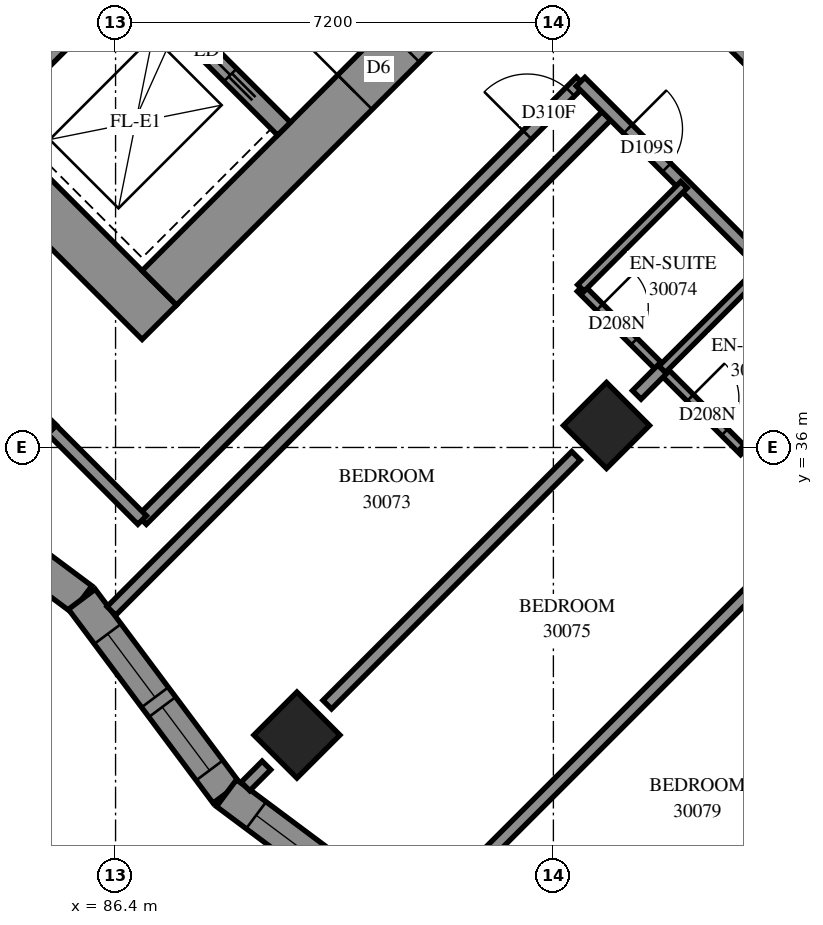
"""IFC4 building model, lengths in metres.
Left out: names, types, materials, properties, quantities, classifications, styles, units other than length and angle.
Written with IfcOpenShell. Run it as: python <this file> out.ifc"""

import sys

from ifc_helpers import new_model, si_unit, direction, frame, frame_2d, origin, origin_2d, place, context, subcontext, project, spatial, polyline, rectangle, outline, extrude, element, fill, save


model = new_model("IFC4")
c1 = context("Model", 3, precision=1e-05, world=origin(), true_north=direction((0.0, 1.0)))
c2 = subcontext(c1, "Body", "Model", "MODEL_VIEW")
j1 = project(units=[si_unit("LENGTHUNIT", "METRE"), si_unit("PLANEANGLEUNIT", "RADIAN")], contexts=[c1])
p1 = place(None, origin())
s1 = spatial("IfcSite", under=j1, at=p1, CompositionType="ELEMENT")
p2 = place(p1, origin())
s2 = spatial("IfcBuilding", under=s1, at=p2, CompositionType="ELEMENT")
p3 = place(p2, frame((0.0, 0.0, 111.8)))
s3 = spatial("IfcBuildingStorey", under=s2, at=p3, CompositionType="ELEMENT", Elevation=111.8)
for number, where, z_axis, x_axis in (
    (1, (94.474, 36.362, 0.0), (0.0, 0.0, 1.0), (0.707, -0.707, 0.0)),
    (2, (89.382, 31.271, 0.0), (0.0, 0.0, 1.0), (0.707, -0.707, 0.0)),
):
    element("IfcColumn", number, at=place(p3, frame(where, z_axis=z_axis, x_axis=x_axis)), inside=s3, PredefinedType="COLUMN", context=c2, shape_type="SweptSolid", body=[
        extrude(rectangle(XDim=1.0, YDim=1.0, at=origin_2d()), origin(), (0.0, 0.0, 1.0), 3.1),
    ])
p4 = place(p3, frame((75.806, 49.373, -0.3), z_axis=(0.0, 0.0, 1.0), x_axis=(0.7071067812, -0.7071067812, 0.0)))
e3 = element("IfcWall", 3, at=p4, inside=s3, PredefinedType="SHEAR", context=c2, shape_type="SweptSolid", body=[
    extrude(rectangle(XDim=16.0, YDim=0.8, at=frame_2d((8.0, 0.0))), origin(), (0.0, 0.0, 1.0), 2.7),
])
p5 = place(p3, frame((87.12, 38.625, -0.3), z_axis=(0.0, 0.0, 1.0), x_axis=(0.7071067812, 0.7071067812, 0.0)))
e4 = element("IfcWall", 4, at=p5, inside=s3, PredefinedType="SHEAR", context=c2, shape_type="SweptSolid", body=[
    extrude(rectangle(XDim=14.4, YDim=0.8, at=frame_2d((7.2, 0.0))), origin(), (0.0, 0.0, 1.0), 2.7),
])
p6 = place(p5, frame((4.55, 0.0, 0.3)))
e5 = element("IfcOpeningElement", 5, at=p6, cuts=e4, PredefinedType="OPENING", context=c2, shape_type="SweptSolid", body=[
    extrude(rectangle(XDim=1.1, YDim=2.1, at=frame_2d((0.55, 1.05))), frame((0.0, 0.41, 0.0), z_axis=(0.0, -1.0, 0.0), x_axis=(1.0, 0.0, 0.0)), (0.0, 0.0, 1.0), 0.82),
])
p7 = place(p5, frame((11.35, 0.0, 0.3)))
e6 = element("IfcOpeningElement", 6, at=p7, cuts=e4, PredefinedType="OPENING", context=c2, shape_type="SweptSolid", body=[
    extrude(rectangle(XDim=1.1, YDim=2.1, at=frame_2d((0.55, 1.05))), frame((0.0, 0.41, 0.0), z_axis=(0.0, -1.0, 0.0), x_axis=(1.0, 0.0, 0.0)), (0.0, 0.0, 1.0), 0.82),
])
p8 = place(p3, frame((84.291, 41.453, 0.0), z_axis=(0.0, 0.0, 1.0), x_axis=(0.7071067812, 0.7071067812, 0.0)))
e7 = element("IfcWall", 7, at=p8, inside=s3, PredefinedType="SOLIDWALL", context=c2, shape_type="SweptSolid", body=[
    extrude(rectangle(XDim=3.3, YDim=0.3, at=frame_2d((1.65, 0.0))), origin(), (0.0, 0.0, 1.0), 3.1),
])
p9 = place(p3, frame((78.988, 51.423, 0.0), z_axis=(0.0, 0.0, 1.0), x_axis=(0.7071067812, -0.7071067812, 0.0)))
e8 = element("IfcWall", 8, at=p9, inside=s3, PredefinedType="SOLIDWALL", context=c2, shape_type="SweptSolid", body=[
    extrude(rectangle(XDim=14.4, YDim=0.3, at=frame_2d((7.2, 0.0))), origin(), (0.0, 0.0, 1.0), 3.1),
])
p10 = place(p9, frame((1.25, 0.0, 0.0)))
e9 = element("IfcOpeningElement", 9, at=p10, cuts=e8, PredefinedType="OPENING", context=c2, shape_type="SweptSolid", body=[
    extrude(rectangle(XDim=1.1, YDim=2.1, at=frame_2d((0.55, 1.05))), frame((0.0, 0.16, 0.0), z_axis=(0.0, -1.0, 0.0), x_axis=(1.0, 0.0, 0.0)), (0.0, 0.0, 1.0), 0.32),
])
p11 = place(p9, frame((4.85, 0.0, 0.0)))
e10 = element("IfcOpeningElement", 10, at=p11, cuts=e8, PredefinedType="OPENING", context=c2, shape_type="SweptSolid", body=[
    extrude(rectangle(XDim=1.1, YDim=2.1, at=frame_2d((0.55, 1.05))), frame((0.0, 0.16, 0.0), z_axis=(0.0, -1.0, 0.0), x_axis=(1.0, 0.0, 0.0)), (0.0, 0.0, 1.0), 0.32),
])
p12 = place(p9, frame((8.45, 0.0, 0.0)))
e11 = element("IfcOpeningElement", 11, at=p12, cuts=e8, PredefinedType="OPENING", context=c2, shape_type="SweptSolid", body=[
    extrude(rectangle(XDim=1.1, YDim=2.1, at=frame_2d((0.55, 1.05))), frame((0.0, 0.16, 0.0), z_axis=(0.0, -1.0, 0.0), x_axis=(1.0, 0.0, 0.0)), (0.0, 0.0, 1.0), 0.32),
])
p13 = place(p9, frame((12.05, 0.0, 0.0)))
e12 = element("IfcOpeningElement", 12, at=p13, cuts=e8, PredefinedType="OPENING", context=c2, shape_type="SweptSolid", body=[
    extrude(rectangle(XDim=1.1, YDim=2.1, at=frame_2d((0.55, 1.05))), frame((0.0, 0.16, 0.0), z_axis=(0.0, -1.0, 0.0), x_axis=(1.0, 0.0, 0.0)), (0.0, 0.0, 1.0), 0.32),
])
p14 = place(p3, frame((82.658, 35.882, 0.0), z_axis=(0.0, 0.0, 1.0), x_axis=(0.8014458841, -0.5980672997, 0.0)))
e13 = element("IfcWall", 13, at=p14, inside=s3, PredefinedType="SOLIDWALL", context=c2, shape_type="SweptSolid", body=[
    extrude(outline(polyline([(-0.04, -0.275), (3.937, -0.275), (4.017, 0.275), (0.04, 0.275), (-0.04, -0.275)])), origin(), (0.0, 0.0, 1.0), 3.1),
])
p15 = place(p14, frame((1.701, 0.0, 0.5)))
e14 = element("IfcOpeningElement", 14, at=p15, cuts=e13, PredefinedType="OPENING", context=c2, shape_type="SweptSolid", body=[
    extrude(rectangle(XDim=1.2, YDim=2.45, at=frame_2d((0.6, 1.225))), frame((0.0, 0.285, 0.0), z_axis=(0.0, -1.0, 0.0), x_axis=(1.0, 0.0, 0.0)), (0.0, 0.0, 1.0), 0.57),
])
p16 = place(p3, frame((85.845, 33.504, 0.0), z_axis=(0.0, 0.0, 1.0), x_axis=(0.5980713977, -0.801442826, 0.0)))
e15 = element("IfcWall", 15, at=p16, inside=s3, PredefinedType="SOLIDWALL", context=c2, shape_type="SweptSolid", body=[
    extrude(outline(polyline([(0.04, -0.275), (4.017, -0.275), (3.937, 0.275), (-0.04, 0.275), (0.04, -0.275)])), origin(), (0.0, 0.0, 1.0), 3.1),
])
p17 = place(p16, frame((0.711, 0.0, 0.5)))
e16 = element("IfcOpeningElement", 16, at=p17, cuts=e15, PredefinedType="OPENING", context=c2, shape_type="SweptSolid", body=[
    extrude(rectangle(XDim=1.3, YDim=2.45, at=frame_2d((0.65, 1.225))), frame((0.0, 0.285, 0.0), z_axis=(0.0, -1.0, 0.0), x_axis=(1.0, 0.0, 0.0)), (0.0, 0.0, 1.0), 0.57),
])
p18 = place(p16, frame((2.211, 0.0, 0.5)))
e17 = element("IfcOpeningElement", 17, at=p18, cuts=e15, PredefinedType="OPENING", context=c2, shape_type="SweptSolid", body=[
    extrude(rectangle(XDim=1.3, YDim=2.45, at=frame_2d((0.65, 1.225))), frame((0.0, 0.285, 0.0), z_axis=(0.0, -1.0, 0.0), x_axis=(1.0, 0.0, 0.0)), (0.0, 0.0, 1.0), 0.57),
])
p19 = place(p3, frame((88.224, 30.316, 0.0), z_axis=(0.0, 0.0, 1.0), x_axis=(0.8014458841, -0.5980672997, 0.0)))
e18 = element("IfcWall", 18, at=p19, inside=s3, PredefinedType="SOLIDWALL", context=c2, shape_type="SweptSolid", body=[
    extrude(outline(polyline([(-0.04, -0.275), (3.937, -0.275), (4.017, 0.275), (0.04, 0.275), (-0.04, -0.275)])), origin(), (0.0, 0.0, 1.0), 3.1),
])
p20 = place(p19, frame((0.609, 0.0, 0.5)))
e19 = element("IfcOpeningElement", 19, at=p20, cuts=e18, PredefinedType="OPENING", context=c2, shape_type="SweptSolid", body=[
    extrude(rectangle(XDim=1.3, YDim=2.45, at=frame_2d((0.65, 1.225))), frame((0.0, 0.285, 0.0), z_axis=(0.0, -1.0, 0.0), x_axis=(1.0, 0.0, 0.0)), (0.0, 0.0, 1.0), 0.57),
])
p21 = place(p19, frame((2.109, 0.0, 0.5)))
e20 = element("IfcOpeningElement", 20, at=p21, cuts=e18, PredefinedType="OPENING", context=c2, shape_type="SweptSolid", body=[
    extrude(rectangle(XDim=1.3, YDim=2.45, at=frame_2d((0.65, 1.225))), frame((0.0, 0.285, 0.0), z_axis=(0.0, -1.0, 0.0), x_axis=(1.0, 0.0, 0.0)), (0.0, 0.0, 1.0), 0.57),
])
p22 = place(p3, frame((96.474, 23.09, 0.0), z_axis=(0.0, 0.0, 1.0), x_axis=(0.7071067812, 0.7071067812, 0.0)))
e21 = element("IfcWall", 21, at=p22, inside=s3, PredefinedType="PARTITIONING", context=c2, shape_type="SweptSolid", body=[
    extrude(rectangle(XDim=11.67, YDim=0.2, at=frame_2d((5.835, 0.0))), origin(), (0.0, 0.0, 1.0), 3.1),
])
p23 = place(p3, frame((86.331, 33.312, 0.0), z_axis=(0.0, 0.0, 1.0), x_axis=(0.707102476, 0.7071110864, 0.0)))
e22 = element("IfcWall", 22, at=p23, inside=s3, PredefinedType="PARTITIONING", context=c2, shape_type="SweptSolid", body=[
    extrude(rectangle(XDim=11.614, YDim=0.2, at=frame_2d((5.807, 0.0))), origin(), (0.0, 0.0, 1.0), 3.1),
])
p24 = place(p3, frame((91.452, 28.25, 0.0), z_axis=(0.0, 0.0, 1.0), x_axis=(0.7071931897, 0.7070203621, 0.0)))
e23 = element("IfcWall", 23, at=p24, inside=s3, PredefinedType="PARTITIONING", context=c2, shape_type="SweptSolid", body=[
    extrude(rectangle(XDim=11.572, YDim=0.2, at=frame_2d((5.786, 0.0))), origin(), (0.0, 0.0, 1.0), 3.1),
])
p25 = place(p3, frame((86.835, 34.806, 0.0), z_axis=(0.0, 0.0, 1.0), x_axis=(0.7071067812, 0.7071067812, 0.0)))
e24 = element("IfcWall", 24, at=p25, inside=s3, PredefinedType="PARTITIONING", context=c2, shape_type="SweptSolid", body=[
    extrude(rectangle(XDim=10.201, YDim=0.2, at=frame_2d((5.1, 0.0))), origin(), (0.0, 0.0, 1.0), 3.1),
])
p26 = place(p25, frame((8.959, 0.0, 0.0)))
e25 = element("IfcOpeningElement", 25, at=p26, cuts=e24, PredefinedType="OPENING", context=c2, shape_type="SweptSolid", body=[
    extrude(rectangle(XDim=1.0, YDim=2.1, at=frame_2d((0.5, 1.05))), frame((0.0, 0.11, 0.0), z_axis=(0.0, -1.0, 0.0), x_axis=(1.0, 0.0, 0.0)), (0.0, 0.0, 1.0), 0.22),
])
p27 = place(p3, frame((94.047, 42.015, 0.0), z_axis=(0.0, 0.0, 1.0), x_axis=(0.7071067812, -0.7071067812, 0.0)))
e26 = element("IfcWall", 26, at=p27, inside=s3, PredefinedType="PARTITIONING", context=c2, shape_type="SweptSolid", body=[
    extrude(rectangle(XDim=9.6, YDim=0.2, at=frame_2d((4.8, 0.0))), origin(), (0.0, 0.0, 1.0), 3.1),
])
p28 = place(p27, frame((1.099, 0.0, 0.0)))
e27 = element("IfcOpeningElement", 27, at=p28, cuts=e26, PredefinedType="OPENING", context=c2, shape_type="SweptSolid", body=[
    extrude(rectangle(XDim=0.9, YDim=2.1, at=frame_2d((0.45, 1.05))), frame((0.0, 0.11, 0.0), z_axis=(0.0, -1.0, 0.0), x_axis=(1.0, 0.0, 0.0)), (0.0, 0.0, 1.0), 0.22),
])
p29 = place(p27, frame((6.649, 0.0, 0.0)))
e28 = element("IfcOpeningElement", 28, at=p29, cuts=e26, PredefinedType="OPENING", context=c2, shape_type="SweptSolid", body=[
    extrude(rectangle(XDim=0.9, YDim=2.1, at=frame_2d((0.45, 1.05))), frame((0.0, 0.11, 0.0), z_axis=(0.0, -1.0, 0.0), x_axis=(1.0, 0.0, 0.0)), (0.0, 0.0, 1.0), 0.22),
])
p30 = place(p27, frame((8.3, 0.0, 0.0)))
e29 = element("IfcOpeningElement", 29, at=p30, cuts=e26, PredefinedType="OPENING", context=c2, shape_type="SweptSolid", body=[
    extrude(rectangle(XDim=0.9, YDim=2.1, at=frame_2d((0.45, 1.05))), frame((0.0, 0.11, 0.0), z_axis=(0.0, -1.0, 0.0), x_axis=(1.0, 0.0, 0.0)), (0.0, 0.0, 1.0), 0.22),
])
p31 = place(p3, frame((96.103, 43.083, 0.0), z_axis=(0.0, 0.0, 1.0), x_axis=(0.7071067812, -0.7071067812, 0.0)))
e30 = element("IfcWall", 30, at=p31, inside=s3, PredefinedType="PARTITIONING", context=c2, shape_type="SweptSolid", body=[
    extrude(rectangle(XDim=8.491, YDim=0.2, at=frame_2d((4.245, 0.0))), origin(), (0.0, 0.0, 1.0), 3.1),
])
p32 = place(p31, frame((1.995, 0.0, 0.0)))
e31 = element("IfcOpeningElement", 31, at=p32, cuts=e30, PredefinedType="OPENING", context=c2, shape_type="SweptSolid", body=[
    extrude(rectangle(XDim=0.9, YDim=2.1, at=frame_2d((0.45, 1.05))), frame((0.0, 0.11, 0.0), z_axis=(0.0, -1.0, 0.0), x_axis=(1.0, 0.0, 0.0)), (0.0, 0.0, 1.0), 0.22),
])
p33 = place(p31, frame((4.27, 0.0, 0.0)))
e32 = element("IfcOpeningElement", 32, at=p33, cuts=e30, PredefinedType="OPENING", context=c2, shape_type="SweptSolid", body=[
    extrude(rectangle(XDim=0.9, YDim=2.1, at=frame_2d((0.45, 1.05))), frame((0.0, 0.11, 0.0), z_axis=(0.0, -1.0, 0.0), x_axis=(1.0, 0.0, 0.0)), (0.0, 0.0, 1.0), 0.22),
])
p34 = place(p3, frame((89.881, 31.771, 0.0), z_axis=(0.0, 0.0, 1.0), x_axis=(0.7071067812, 0.7071067812, 0.0)))
e33 = element("IfcWall", 33, at=p34, inside=s3, PredefinedType="PARTITIONING", context=c2, shape_type="SweptSolid", body=[
    extrude(rectangle(XDim=5.787, YDim=0.2, at=frame_2d((2.893, 0.0))), origin(), (0.0, 0.0, 1.0), 3.1),
])
p35 = place(p3, frame((94.973, 26.681, 0.0), z_axis=(0.0, 0.0, 1.0), x_axis=(0.7071067812, 0.7071067812, 0.0)))
e34 = element("IfcWall", 34, at=p35, inside=s3, PredefinedType="PARTITIONING", context=c2, shape_type="SweptSolid", body=[
    extrude(rectangle(XDim=5.784, YDim=0.2, at=frame_2d((2.892, 0.0))), origin(), (0.0, 0.0, 1.0), 3.1),
])
p36 = place(p3, frame((94.047, 38.621, 0.0), z_axis=(0.0, 0.0, 1.0), x_axis=(0.7071067812, -0.7071067812, 0.0)))
e35 = element("IfcWall", 35, at=p36, inside=s3, PredefinedType="PARTITIONING", context=c2, shape_type="SweptSolid", body=[
    extrude(rectangle(XDim=3.799, YDim=0.15, at=frame_2d((1.899, 0.0))), origin(), (0.0, 0.0, 1.0), 3.1),
])
p37 = place(p36, frame((0.444, 0.0, 0.0)))
e36 = element("IfcOpeningElement", 36, at=p37, cuts=e35, PredefinedType="OPENING", context=c2, shape_type="SweptSolid", body=[
    extrude(rectangle(XDim=0.8, YDim=2.1, at=frame_2d((0.4, 1.05))), frame((0.0, 0.085, 0.0), z_axis=(0.0, -1.0, 0.0), x_axis=(1.0, 0.0, 0.0)), (0.0, 0.0, 1.0), 0.17),
])
p38 = place(p36, frame((2.551, 0.0, 0.0)))
e37 = element("IfcOpeningElement", 37, at=p38, cuts=e35, PredefinedType="OPENING", context=c2, shape_type="SweptSolid", body=[
    extrude(rectangle(XDim=0.8, YDim=2.1, at=frame_2d((0.4, 1.05))), frame((0.0, 0.085, 0.0), z_axis=(0.0, -1.0, 0.0), x_axis=(1.0, 0.0, 0.0)), (0.0, 0.0, 1.0), 0.17),
])
for number, where, z_axis, x_axis in (
    (38, (95.389, 37.285, 0.0), (0.0, 0.0, 1.0), (0.708, 0.707, 0.0)),
    (39, (94.052, 38.622, 0.0), (0.0, 0.0, 1.0), (0.707, 0.708, 0.0)),
    (40, (96.739, 35.935, 0.0), (0.0, 0.0, 1.0), (0.708, 0.707, 0.0)),
):
    element("IfcWall", number, at=place(p3, frame(where, z_axis=z_axis, x_axis=x_axis)), inside=s3, PredefinedType="PARTITIONING", context=c2, shape_type="SweptSolid", body=[
        extrude(rectangle(XDim=2.4, YDim=0.15, at=frame_2d((1.2, 0.0))), origin(), (0.0, 0.0, 1.0), 3.1),
    ])
p39 = place(p3, frame((85.353, 36.293, 0.0), z_axis=(0.0, 0.0, 1.0), x_axis=(0.7066304548, -0.7075827869, 0.0)))
e41 = element("IfcWall", 41, at=p39, inside=s3, PredefinedType="PARTITIONING", context=c2, shape_type="SweptSolid", body=[
    extrude(rectangle(XDim=2.1, YDim=0.2, at=frame_2d((1.05, 0.0))), origin(), (0.0, 0.0, 1.0), 3.1),
])
p40 = place(p3, frame((84.795, 36.855, 0.0), z_axis=(0.0, 0.0, 1.0), x_axis=(0.7071067812, -0.7071067812, 0.0)))
e42 = element("IfcWall", 42, at=p40, inside=s3, PredefinedType="PARTITIONING", context=c2, shape_type="SweptSolid", body=[
    extrude(rectangle(XDim=0.792, YDim=0.2, at=frame_2d((0.396, 0.0))), origin(), (0.0, 0.0, 1.0), 3.1),
])
p41 = place(p3, frame((94.971, 36.865, 0.0), z_axis=(0.0, 0.0, 1.0), x_axis=(0.7054171665, 0.7087923682, 0.0)))
e43 = element("IfcWall", 43, at=p41, inside=s3, PredefinedType="PARTITIONING", context=c2, shape_type="SweptSolid", body=[
    extrude(rectangle(XDim=0.593, YDim=0.2, at=frame_2d((0.296, 0.0))), origin(), (0.0, 0.0, 1.0), 3.1),
])
p42 = place(p3, frame((88.536, 30.426, 0.0), z_axis=(0.0, 0.0, 1.0), x_axis=(0.7071067812, 0.7071067812, 0.0)))
e44 = element("IfcWall", 44, at=p42, inside=s3, PredefinedType="PARTITIONING", context=c2, shape_type="SweptSolid", body=[
    extrude(rectangle(XDim=0.488, YDim=0.2, at=frame_2d((0.244, 0.0))), origin(), (0.0, 0.0, 1.0), 3.1),
])
p43 = place(p17, origin())
e45 = element("IfcWindow", 45, at=p43, inside=s3, PartitioningType="SINGLE_PANEL", PredefinedType="WINDOW", context=c2, shape_type="SweptSolid", body=[
    extrude(rectangle(XDim=1.3, YDim=2.45, at=frame_2d((0.65, 1.225))), frame((0.0, 0.155, 0.0), z_axis=(0.0, -1.0, 0.0), x_axis=(1.0, 0.0, 0.0)), (0.0, 0.0, 1.0), 0.06),
])
fill(e16, e45)
p44 = place(p18, origin())
e46 = element("IfcWindow", 46, at=p44, inside=s3, PartitioningType="SINGLE_PANEL", PredefinedType="WINDOW", context=c2, shape_type="SweptSolid", body=[
    extrude(rectangle(XDim=1.3, YDim=2.45, at=frame_2d((0.65, 1.225))), frame((0.0, 0.155, 0.0), z_axis=(0.0, -1.0, 0.0), x_axis=(1.0, 0.0, 0.0)), (0.0, 0.0, 1.0), 0.06),
])
fill(e17, e46)
p45 = place(p20, origin())
e47 = element("IfcWindow", 47, at=p45, inside=s3, PartitioningType="SINGLE_PANEL", PredefinedType="WINDOW", context=c2, shape_type="SweptSolid", body=[
    extrude(rectangle(XDim=1.3, YDim=2.45, at=frame_2d((0.65, 1.225))), frame((0.0, 0.155, 0.0), z_axis=(0.0, -1.0, 0.0), x_axis=(1.0, 0.0, 0.0)), (0.0, 0.0, 1.0), 0.06),
])
fill(e19, e47)
p46 = place(p6, origin())
e48 = element("IfcDoor", 48, at=p46, inside=s3, OperationType="DOUBLE_DOOR_SINGLE_SWING", PredefinedType="DOOR", context=c2, shape_type="SweptSolid", body=[
    extrude(rectangle(XDim=1.1, YDim=2.1, at=frame_2d((0.55, 1.05))), frame((0.0, 0.025, 0.0), z_axis=(0.0, -1.0, 0.0), x_axis=(1.0, 0.0, 0.0)), (0.0, 0.0, 1.0), 0.05),
])
fill(e5, e48)
p47 = place(p13, origin())
e49 = element("IfcDoor", 49, at=p47, inside=s3, OperationType="SLIDING_TO_RIGHT", PredefinedType="DOOR", context=c2, shape_type="SweptSolid", body=[
    extrude(rectangle(XDim=1.1, YDim=2.1, at=frame_2d((0.55, 1.05))), frame((0.0, 0.025, 0.0), z_axis=(0.0, -1.0, 0.0), x_axis=(1.0, 0.0, 0.0)), (0.0, 0.0, 1.0), 0.05),
])
fill(e12, e49)
p48 = place(p26, origin())
e50 = element("IfcDoor", 50, at=p48, inside=s3, OperationType="SINGLE_SWING_LEFT", PredefinedType="DOOR", context=c2, shape_type="SweptSolid", body=[
    extrude(rectangle(XDim=1.0, YDim=2.1, at=frame_2d((0.5, 1.05))), frame((0.0, 0.025, 0.0), z_axis=(0.0, -1.0, 0.0), x_axis=(1.0, 0.0, 0.0)), (0.0, 0.0, 1.0), 0.05),
])
fill(e25, e50)
p49 = place(p28, origin())
e51 = element("IfcDoor", 51, at=p49, inside=s3, OperationType="SINGLE_SWING_LEFT", PredefinedType="DOOR", context=c2, shape_type="SweptSolid", body=[
    extrude(rectangle(XDim=0.9, YDim=2.1, at=frame_2d((0.45, 1.05))), frame((0.0, 0.025, 0.0), z_axis=(0.0, -1.0, 0.0), x_axis=(1.0, 0.0, 0.0)), (0.0, 0.0, 1.0), 0.05),
])
fill(e27, e51)
p50 = place(p37, origin())
e52 = element("IfcDoor", 52, at=p50, inside=s3, OperationType="SINGLE_SWING_RIGHT", PredefinedType="DOOR", context=c2, shape_type="SweptSolid", body=[
    extrude(rectangle(XDim=0.8, YDim=2.1, at=frame_2d((0.4, 1.05))), frame((0.0, 0.025, 0.0), z_axis=(0.0, -1.0, 0.0), x_axis=(1.0, 0.0, 0.0)), (0.0, 0.0, 1.0), 0.05),
])
fill(e36, e52)
p51 = place(p38, origin())
e53 = element("IfcDoor", 53, at=p51, inside=s3, OperationType="SINGLE_SWING_RIGHT", PredefinedType="DOOR", context=c2, shape_type="SweptSolid", body=[
    extrude(rectangle(XDim=0.8, YDim=2.1, at=frame_2d((0.4, 1.05))), frame((0.0, 0.025, 0.0), z_axis=(0.0, -1.0, 0.0), x_axis=(1.0, 0.0, 0.0)), (0.0, 0.0, 1.0), 0.05),
])
fill(e37, e53)
save(model, sys.argv[1])
